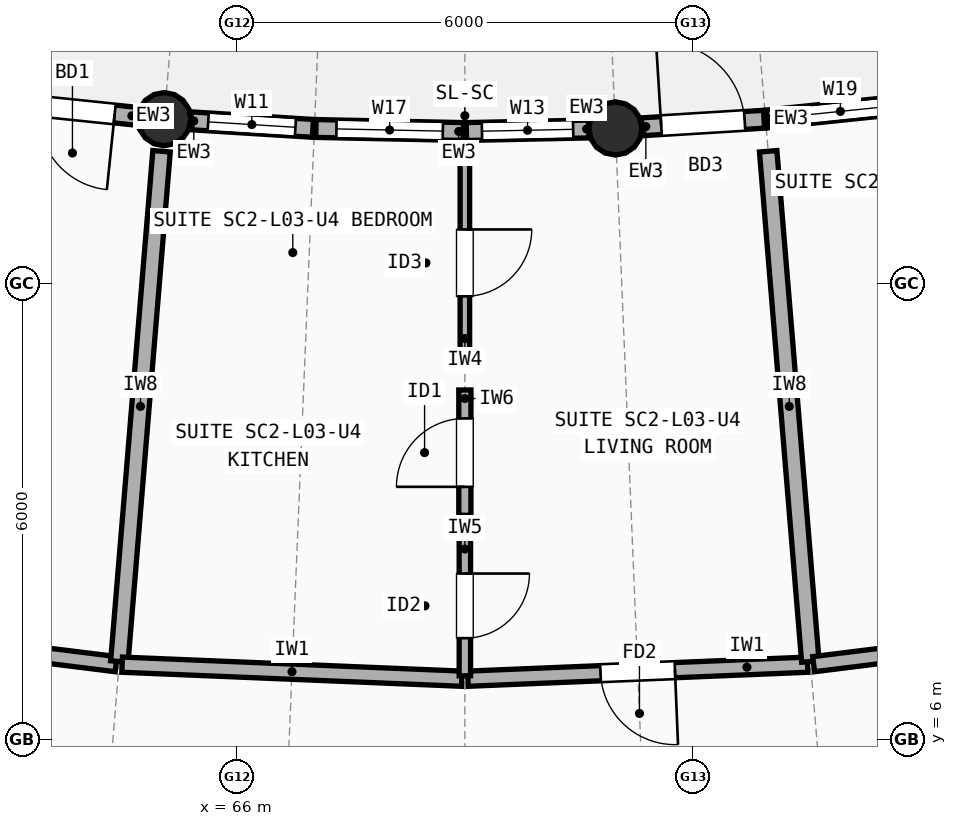
"""IFC4 building model, lengths in metres.
Left out: names, types, materials, properties, quantities, classifications, styles, units other than length and angle.
Written with IfcOpenShell. Run it as: python <this file> out.ifc"""

import sys

from ifc_helpers import new_model, si_unit, direction, frame, frame_2d, origin, origin_2d, place, context, subcontext, project, spatial, rectangle, circle, extrude, element, fill, save


model = new_model("IFC4")
c1 = context("Model", 3, precision=1e-05, world=origin(), true_north=direction((0.0, 1.0)))
c2 = subcontext(c1, "Body", "Model", "MODEL_VIEW")
j1 = project(units=[si_unit("LENGTHUNIT", "METRE"), si_unit("PLANEANGLEUNIT", "RADIAN")], contexts=[c1])
p1 = place(None, origin())
s1 = spatial("IfcSite", under=j1, at=p1, CompositionType="ELEMENT")
p2 = place(p1, origin())
s2 = spatial("IfcBuilding", under=s1, at=p2, CompositionType="ELEMENT")
p3 = place(p2, frame((0.0, 0.0, 10.9)))
s3 = spatial("IfcBuildingStorey", under=s2, at=p3, CompositionType="ELEMENT", Elevation=10.9)
for number, where, z_axis, x_axis in (
    (1, (65.044, 14.163, 0.0), (0.0, 0.0, 1.0), (1.0, 0.0, 0.0)),
    (2, (70.979, 14.041, 0.0), (0.0, 0.0, 1.0), (1.0, 0.0, 0.0)),
):
    element("IfcColumn", number, at=place(p3, frame(where, z_axis=z_axis, x_axis=x_axis)), inside=s3, PredefinedType="COLUMN", context=c2, shape_type="SweptSolid", body=[
        extrude(circle(Radius=0.35, at=origin_2d()), origin(), (0.0, 0.0, 1.0), 2.948),
    ])
p4 = place(p3, frame((63.094, 14.365, 0.0), z_axis=(0.0, 0.0, 1.0), x_axis=(0.994685905428, -0.10295605637, 0.0)))
e3 = element("IfcWall", 3, at=p4, inside=s3, PredefinedType="STANDARD", context=c2, shape_type="SweptSolid", body=[
    extrude(rectangle(XDim=1.61, YDim=0.235, at=frame_2d((0.805, 0.0))), origin(), (0.0, 0.0, 1.0), 2.684),
])
p5 = place(p4, frame((0.305, 0.0, 0.0)))
e4 = element("IfcOpeningElement", 4, at=p5, cuts=e3, PredefinedType="OPENING", context=c2, shape_type="SweptSolid", body=[
    extrude(rectangle(XDim=1.0, YDim=2.15, at=frame_2d((0.5, 1.075))), frame((0.0, 0.127, 0.0), z_axis=(0.0, -1.0, 0.0), x_axis=(1.0, 0.0, 0.0)), (0.0, 0.0, 1.0), 0.255),
])
p6 = place(p3, frame((65.394, 14.142, 0.0), z_axis=(0.0, 0.0, 1.0), x_axis=(0.998084310064, -0.061868489594, 0.0)))
e5 = element("IfcWall", 5, at=p6, inside=s3, PredefinedType="STANDARD", context=c2, shape_type="SweptSolid", body=[
    extrude(rectangle(XDim=1.61, YDim=0.235, at=frame_2d((0.805, 0.0))), origin(), (0.0, 0.0, 1.0), 2.684),
])
p7 = place(p6, frame((0.23, 0.0, 0.85)))
e6 = element("IfcOpeningElement", 6, at=p7, cuts=e5, PredefinedType="OPENING", context=c2, shape_type="SweptSolid", body=[
    extrude(rectangle(XDim=1.15, YDim=1.45, at=frame_2d((0.575, 0.725))), frame((0.0, 0.127, 0.0), z_axis=(0.0, -1.0, 0.0), x_axis=(1.0, 0.0, 0.0)), (0.0, 0.0, 1.0), 0.255),
])
p8 = place(p3, frame((67.04, 14.04, 0.0), z_axis=(0.0, 0.0, 1.0), x_axis=(0.999789612304, -0.020511731505, 0.0)))
e7 = element("IfcWall", 7, at=p8, inside=s3, PredefinedType="STANDARD", context=c2, shape_type="SweptSolid", body=[
    extrude(rectangle(XDim=1.94, YDim=0.235, at=frame_2d((0.97, 0.0))), origin(), (0.0, 0.0, 1.0), 2.684),
])
p9 = place(p8, frame((0.27, 0.0, 0.85)))
e8 = element("IfcOpeningElement", 8, at=p9, cuts=e7, PredefinedType="OPENING", context=c2, shape_type="SweptSolid", body=[
    extrude(rectangle(XDim=1.4, YDim=1.5, at=frame_2d((0.7, 0.75))), frame((0.0, 0.127, 0.0), z_axis=(0.0, -1.0, 0.0), x_axis=(1.0, 0.0, 0.0)), (0.0, 0.0, 1.0), 0.255),
])
p10 = place(p3, frame((69.02, 14.0, 0.0), z_axis=(0.0, 0.0, 1.0), x_axis=(0.999787311946, 0.020623551407, 0.0)))
e9 = element("IfcWall", 9, at=p10, inside=s3, PredefinedType="STANDARD", context=c2, shape_type="SweptSolid", body=[
    extrude(rectangle(XDim=1.61, YDim=0.235, at=frame_2d((0.805, 0.0))), origin(), (0.0, 0.0, 1.0), 2.684),
])
p11 = place(p10, frame((0.205, 0.0, 0.85)))
e10 = element("IfcOpeningElement", 10, at=p11, cuts=e9, PredefinedType="OPENING", context=c2, shape_type="SweptSolid", body=[
    extrude(rectangle(XDim=1.2, YDim=1.45, at=frame_2d((0.6, 0.725))), frame((0.0, 0.127, 0.0), z_axis=(0.0, -1.0, 0.0), x_axis=(1.0, 0.0, 0.0)), (0.0, 0.0, 1.0), 0.255),
])
p12 = place(p3, frame((71.329, 14.062, 0.0), z_axis=(0.0, 0.0, 1.0), x_axis=(0.998084310064, 0.061868489594, 0.0)))
e11 = element("IfcWall", 11, at=p12, inside=s3, PredefinedType="STANDARD", context=c2, shape_type="SweptSolid", body=[
    extrude(rectangle(XDim=1.61, YDim=0.235, at=frame_2d((0.805, 0.0))), origin(), (0.0, 0.0, 1.0), 2.684),
])
p13 = place(p12, frame((0.255, 0.0, 0.0)))
e12 = element("IfcOpeningElement", 12, at=p13, cuts=e11, PredefinedType="OPENING", context=c2, shape_type="SweptSolid", body=[
    extrude(rectangle(XDim=1.1, YDim=2.15, at=frame_2d((0.55, 1.075))), frame((0.0, 0.127, 0.0), z_axis=(0.0, -1.0, 0.0), x_axis=(1.0, 0.0, 0.0)), (0.0, 0.0, 1.0), 0.255),
])
p14 = place(p3, frame((72.976, 14.165, 0.0), z_axis=(0.0, 0.0, 1.0), x_axis=(0.994688684624, 0.10292920228, 0.0)))
e13 = element("IfcWall", 13, at=p14, inside=s3, PredefinedType="STANDARD", context=c2, shape_type="SweptSolid", body=[
    extrude(rectangle(XDim=1.94, YDim=0.235, at=frame_2d((0.97, 0.0))), origin(), (0.0, 0.0, 1.0), 2.684),
])
p15 = place(p14, frame((0.22, 0.0, 0.85)))
e14 = element("IfcOpeningElement", 14, at=p15, cuts=e13, PredefinedType="OPENING", context=c2, shape_type="SweptSolid", body=[
    extrude(rectangle(XDim=1.5, YDim=1.5, at=frame_2d((0.75, 0.75))), frame((0.0, 0.127, 0.0), z_axis=(0.0, -1.0, 0.0), x_axis=(1.0, 0.0, 0.0)), (0.0, 0.0, 1.0), 0.255),
])
p16 = place(p3, frame((59.972, 7.545, 0.0), z_axis=(0.0, 0.0, 1.0), x_axis=(0.992349920368, -0.123457019023, 0.0)))
e15 = element("IfcWall", 15, at=p16, inside=s3, PredefinedType="SOLIDWALL", context=c2, shape_type="SweptSolid", body=[
    extrude(rectangle(XDim=4.473, YDim=0.2, at=frame_2d((2.237, 0.0))), origin(), (0.0, 0.0, 1.0), 2.742),
])
p17 = place(p16, frame((1.737, 0.0, 0.0)))
e16 = element("IfcOpeningElement", 16, at=p17, cuts=e15, PredefinedType="OPENING", context=c2, shape_type="SweptSolid", body=[
    extrude(rectangle(XDim=1.0, YDim=2.15, at=frame_2d((0.5, 1.075))), frame((0.0, 0.11, 0.0), z_axis=(0.0, -1.0, 0.0), x_axis=(1.0, 0.0, 0.0)), (0.0, 0.0, 1.0), 0.22),
])
p18 = place(p3, frame((65.009, 13.741, 0.0), z_axis=(0.0, 0.0, 1.0), x_axis=(-0.082418569382, -0.996597802236, 0.0)))
e17 = element("IfcWall", 17, at=p18, inside=s3, PredefinedType="SOLIDWALL", context=c2, shape_type="SweptSolid", body=[
    extrude(rectangle(XDim=6.736, YDim=0.23, at=frame_2d((3.368, 0.0))), origin(), (0.0, 0.0, 1.0), 2.762),
])
p19 = place(p3, frame((64.491, 6.986, 0.0), z_axis=(0.0, 0.0, 1.0), x_axis=(0.999148329529, -0.041262762871, 0.0)))
e18 = element("IfcWall", 18, at=p19, inside=s3, PredefinedType="SOLIDWALL", context=c2, shape_type="SweptSolid", body=[
    extrude(rectangle(XDim=4.473, YDim=0.2, at=frame_2d((2.237, 0.0))), origin(), (0.0, 0.0, 1.0), 2.722),
])
p20 = place(p3, frame((69.04, 6.802, 0.0), z_axis=(0.0, 0.0, 1.0), x_axis=(0.999148329529, 0.041262762871, 0.0)))
e19 = element("IfcWall", 19, at=p20, inside=s3, PredefinedType="SOLIDWALL", context=c2, shape_type="SweptSolid", body=[
    extrude(rectangle(XDim=4.473, YDim=0.2, at=frame_2d((2.237, 0.0))), origin(), (0.0, 0.0, 1.0), 2.762),
])
p21 = place(p20, frame((1.747, 0.0, 0.0)))
e20 = element("IfcOpeningElement", 20, at=p21, cuts=e19, PredefinedType="OPENING", context=c2, shape_type="SweptSolid", body=[
    extrude(rectangle(XDim=0.98, YDim=2.15, at=frame_2d((0.49, 1.075))), frame((0.0, 0.11, 0.0), z_axis=(0.0, -1.0, 0.0), x_axis=(1.0, 0.0, 0.0)), (0.0, 0.0, 1.0), 0.22),
])
p22 = place(p3, frame((69.0, 13.672, 0.0), z_axis=(0.0, 0.0, 1.0), x_axis=(0.0, -1.0, 0.0)))
e21 = element("IfcWall", 21, at=p22, inside=s3, PredefinedType="PARTITIONING", context=c2, shape_type="SweptSolid", body=[
    extrude(rectangle(XDim=2.8, YDim=0.125, at=frame_2d((1.4, 0.0))), origin(), (0.0, 0.0, 1.0), 2.742),
])
p23 = place(p22, frame((0.96, 0.0, 0.0)))
e22 = element("IfcOpeningElement", 22, at=p23, cuts=e21, PredefinedType="OPENING", context=c2, shape_type="SweptSolid", body=[
    extrude(rectangle(XDim=0.88, YDim=2.1, at=frame_2d((0.44, 1.05))), frame((0.0, 0.073, 0.0), z_axis=(0.0, -1.0, 0.0), x_axis=(1.0, 0.0, 0.0)), (0.0, 0.0, 1.0), 0.145),
])
p24 = place(p3, frame((69.0, 10.6, 0.0), z_axis=(0.0, 0.0, 1.0), x_axis=(0.0, -1.0, 0.0)))
e23 = element("IfcWall", 23, at=p24, inside=s3, PredefinedType="PLUMBINGWALL", context=c2, shape_type="SweptSolid", body=[
    extrude(rectangle(XDim=1.648, YDim=0.16, at=frame_2d((0.824, 0.0))), origin(), (0.0, 0.0, 1.0), 2.742),
])
p25 = place(p24, frame((0.374, 0.0, 0.0)))
e24 = element("IfcOpeningElement", 24, at=p25, cuts=e23, PredefinedType="OPENING", context=c2, shape_type="SweptSolid", body=[
    extrude(rectangle(XDim=0.9, YDim=2.1, at=frame_2d((0.45, 1.05))), frame((0.0, 0.09, 0.0), z_axis=(0.0, -1.0, 0.0), x_axis=(1.0, 0.0, 0.0)), (0.0, 0.0, 1.0), 0.18),
])
p26 = place(p3, frame((69.0, 8.68, 0.0), z_axis=(0.0, 0.0, 1.0), x_axis=(0.0, -1.0, 0.0)))
e25 = element("IfcWall", 25, at=p26, inside=s3, PredefinedType="PARTITIONING", context=c2, shape_type="SweptSolid", body=[
    extrude(rectangle(XDim=1.84, YDim=0.15, at=frame_2d((0.92, 0.0))), origin(), (0.0, 0.0, 1.0), 2.742),
])
p27 = place(p26, frame((0.495, 0.0, 0.0)))
e26 = element("IfcOpeningElement", 26, at=p27, cuts=e25, PredefinedType="OPENING", context=c2, shape_type="SweptSolid", body=[
    extrude(rectangle(XDim=0.85, YDim=2.1, at=frame_2d((0.425, 1.05))), frame((0.0, 0.085, 0.0), z_axis=(0.0, -1.0, 0.0), x_axis=(1.0, 0.0, 0.0)), (0.0, 0.0, 1.0), 0.17),
])
p28 = place(p3, frame((72.991, 13.741, 0.0), z_axis=(0.0, 0.0, 1.0), x_axis=(0.082418569382, -0.996597802236, 0.0)))
e27 = element("IfcWall", 27, at=p28, inside=s3, PredefinedType="SOLIDWALL", context=c2, shape_type="SweptSolid", body=[
    extrude(rectangle(XDim=6.736, YDim=0.23, at=frame_2d((3.368, 0.0))), origin(), (0.0, 0.0, 1.0), 2.722),
])
p29 = place(p3, frame((73.589, 6.993, 0.0), z_axis=(0.0, 0.0, 1.0), x_axis=(0.992349088432, 0.123463705959, 0.0)))
e28 = element("IfcWall", 28, at=p29, inside=s3, PredefinedType="SOLIDWALL", context=c2, shape_type="SweptSolid", body=[
    extrude(rectangle(XDim=4.473, YDim=0.2, at=frame_2d((2.236, 0.0))), origin(), (0.0, 0.0, 1.0), 2.742),
])
p30 = place(p5, origin())
e29 = element("IfcDoor", 29, at=p30, inside=s3, OperationType="SINGLE_SWING_RIGHT", PredefinedType="DOOR", context=c2, shape_type="SweptSolid", body=[
    extrude(rectangle(XDim=1.0, YDim=2.15, at=frame_2d((0.5, 1.075))), frame((0.0, 0.025, 0.0), z_axis=(0.0, -1.0, 0.0), x_axis=(1.0, 0.0, 0.0)), (0.0, 0.0, 1.0), 0.05),
])
fill(e4, e29)
p31 = place(p7, origin())
e30 = element("IfcWindow", 30, at=p31, inside=s3, PartitioningType="SINGLE_PANEL", PredefinedType="WINDOW", context=c2, shape_type="SweptSolid", body=[
    extrude(rectangle(XDim=1.15, YDim=1.45, at=frame_2d((0.575, 0.725))), frame((0.0, 0.03, 0.0), z_axis=(0.0, -1.0, 0.0), x_axis=(1.0, 0.0, 0.0)), (0.0, 0.0, 1.0), 0.06),
])
fill(e6, e30)
p32 = place(p9, origin())
e31 = element("IfcWindow", 31, at=p32, inside=s3, PartitioningType="SINGLE_PANEL", PredefinedType="WINDOW", context=c2, shape_type="SweptSolid", body=[
    extrude(rectangle(XDim=1.4, YDim=1.5, at=frame_2d((0.7, 0.75))), frame((0.0, 0.03, 0.0), z_axis=(0.0, -1.0, 0.0), x_axis=(1.0, 0.0, 0.0)), (0.0, 0.0, 1.0), 0.06),
])
fill(e8, e31)
p33 = place(p11, origin())
e32 = element("IfcWindow", 32, at=p33, inside=s3, PartitioningType="SINGLE_PANEL", PredefinedType="WINDOW", context=c2, shape_type="SweptSolid", body=[
    extrude(rectangle(XDim=1.2, YDim=1.45, at=frame_2d((0.6, 0.725))), frame((0.0, 0.03, 0.0), z_axis=(0.0, -1.0, 0.0), x_axis=(1.0, 0.0, 0.0)), (0.0, 0.0, 1.0), 0.06),
])
fill(e10, e32)
p34 = place(p13, origin())
e33 = element("IfcDoor", 33, at=p34, inside=s3, OperationType="SINGLE_SWING_LEFT", PredefinedType="DOOR", context=c2, shape_type="SweptSolid", body=[
    extrude(rectangle(XDim=1.1, YDim=2.15, at=frame_2d((0.55, 1.075))), frame((0.0, 0.025, 0.0), z_axis=(0.0, -1.0, 0.0), x_axis=(1.0, 0.0, 0.0)), (0.0, 0.0, 1.0), 0.05),
])
fill(e12, e33)
p35 = place(p15, origin())
e34 = element("IfcWindow", 34, at=p35, inside=s3, PartitioningType="SINGLE_PANEL", PredefinedType="WINDOW", context=c2, shape_type="SweptSolid", body=[
    extrude(rectangle(XDim=1.5, YDim=1.5, at=frame_2d((0.75, 0.75))), frame((0.0, 0.03, 0.0), z_axis=(0.0, -1.0, 0.0), x_axis=(1.0, 0.0, 0.0)), (0.0, 0.0, 1.0), 0.06),
])
fill(e14, e34)
p36 = place(p21, origin())
e35 = element("IfcDoor", 35, at=p36, inside=s3, OperationType="SINGLE_SWING_RIGHT", PredefinedType="DOOR", context=c2, shape_type="SweptSolid", body=[
    extrude(rectangle(XDim=0.98, YDim=2.15, at=frame_2d((0.49, 1.075))), frame((0.0, 0.025, 0.0), z_axis=(0.0, -1.0, 0.0), x_axis=(1.0, 0.0, 0.0)), (0.0, 0.0, 1.0), 0.05),
])
fill(e20, e35)
p37 = place(p23, origin())
e36 = element("IfcDoor", 36, at=p37, inside=s3, OperationType="SINGLE_SWING_LEFT", PredefinedType="DOOR", context=c2, shape_type="SweptSolid", body=[
    extrude(rectangle(XDim=0.88, YDim=2.1, at=frame_2d((0.44, 1.05))), frame((0.0, 0.025, 0.0), z_axis=(0.0, -1.0, 0.0), x_axis=(1.0, 0.0, 0.0)), (0.0, 0.0, 1.0), 0.05),
])
fill(e22, e36)
p38 = place(p25, origin())
e37 = element("IfcDoor", 37, at=p38, inside=s3, OperationType="SINGLE_SWING_RIGHT", PredefinedType="DOOR", context=c2, shape_type="SweptSolid", body=[
    extrude(rectangle(XDim=0.9, YDim=2.1, at=frame_2d((0.45, 1.05))), frame((0.0, 0.025, 0.0), z_axis=(0.0, -1.0, 0.0), x_axis=(1.0, 0.0, 0.0)), (0.0, 0.0, 1.0), 0.05),
])
fill(e24, e37)
p39 = place(p27, origin())
e38 = element("IfcDoor", 38, at=p39, inside=s3, OperationType="SINGLE_SWING_LEFT", PredefinedType="DOOR", context=c2, shape_type="SweptSolid", body=[
    extrude(rectangle(XDim=0.85, YDim=2.1, at=frame_2d((0.425, 1.05))), frame((0.0, 0.025, 0.0), z_axis=(0.0, -1.0, 0.0), x_axis=(1.0, 0.0, 0.0)), (0.0, 0.0, 1.0), 0.05),
])
fill(e26, e38)
save(model, sys.argv[1])
